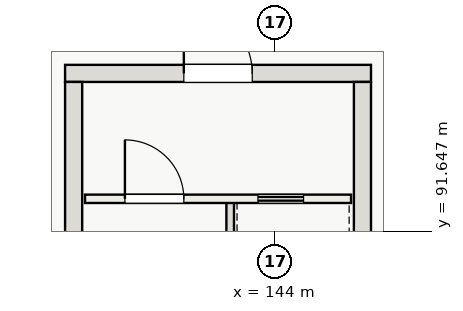
"""IFC4 building model, lengths in metres.
Left out: names, types, materials, properties, quantities, classifications, styles, units other than length and angle.
Written with IfcOpenShell. Run it as: python <this file> out.ifc"""

import sys

from ifc_helpers import new_model, si_unit, direction, frame, frame_2d, origin, place, context, subcontext, project, spatial, rectangle, extrude, element, fill, save


model = new_model("IFC4")
c1 = context("Model", 3, precision=1e-05, world=origin(), true_north=direction((0.0, 1.0)))
c2 = subcontext(c1, "Body", "Model", "MODEL_VIEW")
j1 = project(units=[si_unit("LENGTHUNIT", "METRE"), si_unit("PLANEANGLEUNIT", "RADIAN")], contexts=[c1])
p1 = place(None, origin())
s1 = spatial("IfcSite", under=j1, at=p1, CompositionType="ELEMENT")
p2 = place(p1, origin())
s2 = spatial("IfcBuilding", under=s1, at=p2, CompositionType="ELEMENT")
p3 = place(p2, origin())
s3 = spatial("IfcBuildingStorey", under=s2, at=p3, CompositionType="ELEMENT", Elevation=0.0)
p4 = place(p3, frame((138.475, 95.8, 0.0), z_axis=(0.0, 0.0, 1.0), x_axis=(1.0, 0.0, 0.0)))
e1 = element("IfcWall", 1, at=p4, inside=s3, PredefinedType="SHEAR", context=c2, shape_type="SweptSolid", body=[
    extrude(rectangle(XDim=8.05, YDim=0.45, at=frame_2d((4.025, 0.0))), origin(), (0.0, 0.0, 1.0), 6.0),
])
p5 = place(p4, frame((3.125, 0.0, 0.0)))
e2 = element("IfcOpeningElement", 2, at=p5, cuts=e1, PredefinedType="OPENING", context=c2, shape_type="SweptSolid", body=[
    extrude(rectangle(XDim=1.8, YDim=2.3, at=frame_2d((0.9, 1.15))), frame((0.0, 0.235, 0.0), z_axis=(0.0, -1.0, 0.0), x_axis=(1.0, 0.0, 0.0)), (0.0, 0.0, 1.0), 0.47),
])
for number, where, z_axis, x_axis in (
    (3, (138.7, 84.425, 0.0), (0.0, 0.0, 1.0), (0.0, 1.0, 0.0)),
    (4, (146.3, 84.425, 0.0), (0.0, 0.0, 1.0), (0.0, 1.0, 0.0)),
):
    element("IfcWall", number, at=place(p3, frame(where, z_axis=z_axis, x_axis=x_axis)), inside=s3, PredefinedType="SHEAR", context=c2, shape_type="SweptSolid", body=[
        extrude(rectangle(XDim=11.15, YDim=0.45, at=frame_2d((5.575, 0.0))), origin(), (0.0, 0.0, 1.0), 6.0),
    ])
p6 = place(p3, frame((142.82, 84.45, 0.0), z_axis=(0.0, 0.0, 1.0), x_axis=(0.0, 1.0, 0.0)))
e5 = element("IfcWall", 5, at=p6, inside=s3, PredefinedType="SOLIDWALL", context=c2, shape_type="SweptSolid", body=[
    extrude(rectangle(XDim=8.0, YDim=0.2, at=frame_2d((4.0, 0.0))), origin(), (0.0, 0.0, 1.0), 6.0),
])
p7 = place(p3, frame((139.0, 92.5, 0.0), z_axis=(0.0, 0.0, 1.0), x_axis=(1.0, 0.0, 0.0)))
e6 = element("IfcWall", 6, at=p7, inside=s3, PredefinedType="SOLIDWALL", context=c2, shape_type="SweptSolid", body=[
    extrude(rectangle(XDim=7.0, YDim=0.22, at=frame_2d((3.5, 0.0))), origin(), (0.0, 0.0, 1.0), 5.68),
])
p8 = place(p7, frame((1.05, 0.0, 0.0)))
e7 = element("IfcOpeningElement", 7, at=p8, cuts=e6, PredefinedType="OPENING", context=c2, shape_type="SweptSolid", body=[
    extrude(rectangle(XDim=1.55, YDim=2.2, at=frame_2d((0.775, 1.1))), frame((0.0, 0.12, 0.0), z_axis=(0.0, -1.0, 0.0), x_axis=(1.0, 0.0, 0.0)), (0.0, 0.0, 1.0), 0.24),
])
p9 = place(p7, frame((4.55, 0.0, 0.0)))
e8 = element("IfcOpeningElement", 8, at=p9, cuts=e6, PredefinedType="OPENING", context=c2, shape_type="SweptSolid", body=[
    extrude(rectangle(XDim=1.2, YDim=2.2, at=frame_2d((0.6, 1.1))), frame((0.0, 0.12, 0.0), z_axis=(0.0, -1.0, 0.0), x_axis=(1.0, 0.0, 0.0)), (0.0, 0.0, 1.0), 0.24),
])
p10 = place(p8, origin())
e9 = element("IfcDoor", 9, at=p10, inside=s3, OperationType="SINGLE_SWING_LEFT", PredefinedType="DOOR", context=c2, shape_type="SweptSolid", body=[
    extrude(rectangle(XDim=1.55, YDim=2.2, at=frame_2d((0.775, 1.1))), frame((0.0, 0.025, 0.0), z_axis=(0.0, -1.0, 0.0), x_axis=(1.0, 0.0, 0.0)), (0.0, 0.0, 1.0), 0.05),
])
fill(e7, e9)
p11 = place(p9, origin())
e10 = element("IfcDoor", 10, at=p11, inside=s3, OperationType="SLIDING_TO_LEFT", PredefinedType="DOOR", context=c2, shape_type="SweptSolid", body=[
    extrude(rectangle(XDim=1.2, YDim=2.2, at=frame_2d((0.6, 1.1))), frame((0.0, 0.025, 0.0), z_axis=(0.0, -1.0, 0.0), x_axis=(1.0, 0.0, 0.0)), (0.0, 0.0, 1.0), 0.05),
])
fill(e8, e10)
p12 = place(p5, origin())
e11 = element("IfcDoor", 11, at=p12, inside=s3, OperationType="DOUBLE_DOOR_SINGLE_SWING", PredefinedType="DOOR", context=c2, shape_type="SweptSolid", body=[
    extrude(rectangle(XDim=1.8, YDim=2.3, at=frame_2d((0.9, 1.15))), frame((0.0, 0.025, 0.0), z_axis=(0.0, -1.0, 0.0), x_axis=(1.0, 0.0, 0.0)), (0.0, 0.0, 1.0), 0.05),
])
fill(e2, e11)
save(model, sys.argv[1])
